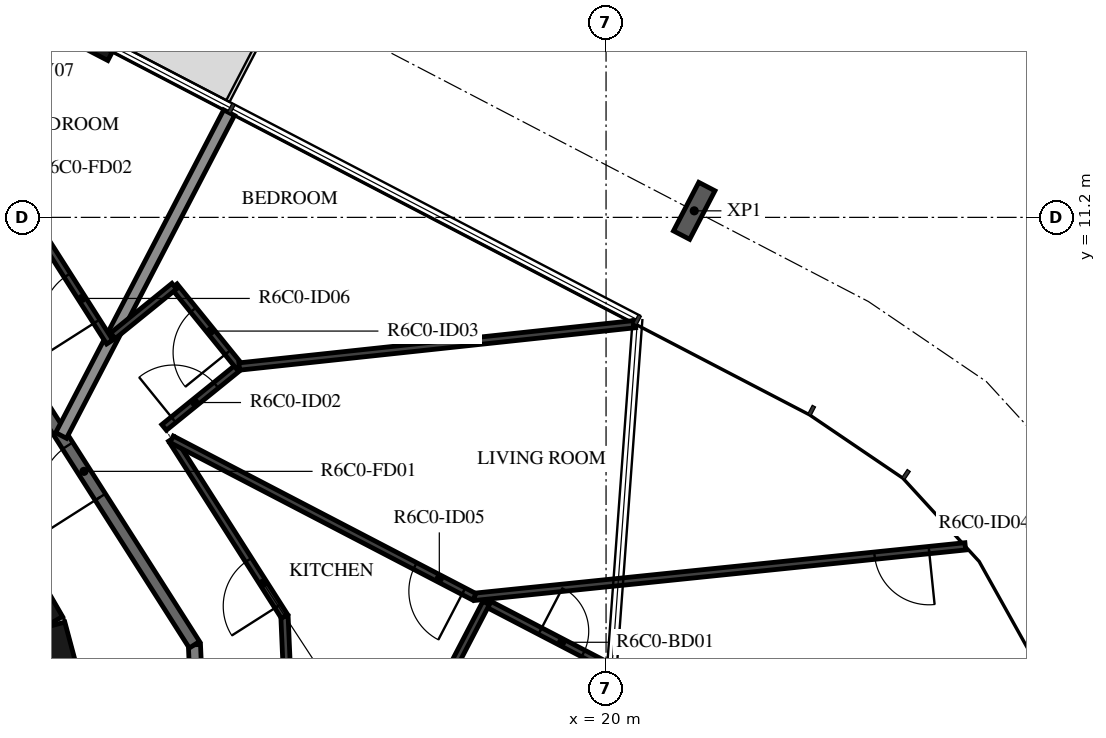
"""IFC4 building model, lengths in metres.
Left out: names, types, materials, properties, quantities, classifications, styles, units other than length and angle.
Written with IfcOpenShell. Run it as: python <this file> out.ifc"""

import sys

from ifc_helpers import new_model, si_unit, direction, frame, frame_2d, origin, origin_2d, place, context, subcontext, project, spatial, rectangle, i_section, extrude, element, fill, save


model = new_model("IFC4")
c1 = context("Model", 3, precision=1e-05, world=origin(), true_north=direction((0.0, 1.0)))
c2 = subcontext(c1, "Body", "Model", "MODEL_VIEW")
j1 = project(units=[si_unit("LENGTHUNIT", "METRE"), si_unit("PLANEANGLEUNIT", "RADIAN")], contexts=[c1])
p1 = place(None, origin())
s1 = spatial("IfcSite", under=j1, at=p1, CompositionType="ELEMENT")
p2 = place(p1, origin())
s2 = spatial("IfcBuilding", under=s1, at=p2, CompositionType="ELEMENT")
p3 = place(p2, frame((0.0, 0.0, 247.7)))
s3 = spatial("IfcBuildingStorey", under=s2, at=p3, CompositionType="ELEMENT", Elevation=247.7)
p4 = place(p3, frame((21.45, 11.308, -0.38), z_axis=(0.0, 0.0, 1.0), x_axis=(0.887010710334, -0.461748849216, 0.0)))
e1 = element("IfcColumn", 1, at=p4, inside=s3, PredefinedType="COLUMN", context=c2, shape_type="SweptSolid", body=[
    extrude(i_section(OverallWidth=0.3, OverallDepth=0.9, WebThickness=0.019, FlangeThickness=0.035, FilletRadius=0.03, at=origin_2d()), origin(), (0.0, 0.0, 1.0), 3.5),
])
p5 = place(p3, frame((11.844, 13.851, 0.0), z_axis=(0.0, 0.0, 1.0), x_axis=(-0.887014349583, 0.461741858221, 0.0)))
e2 = element("IfcWall", 2, at=p5, inside=s3, PredefinedType="STANDARD", context=c2, shape_type="SweptSolid", body=[
    extrude(rectangle(XDim=3.2, YDim=0.16, at=frame_2d((1.6, 0.0))), origin(), (0.0, 0.0, 1.0), 3.12),
])
p6 = place(p5, frame((0.4, 0.0, 0.0)))
e3 = element("IfcOpeningElement", 3, at=p6, cuts=e2, PredefinedType="OPENING", context=c2, shape_type="SweptSolid", body=[
    extrude(rectangle(XDim=2.4, YDim=2.4, at=frame_2d((1.2, 1.2))), frame((0.0, 0.09, 0.0), z_axis=(0.0, -1.0, 0.0), x_axis=(1.0, 0.0, 0.0)), (0.0, 0.0, 1.0), 0.18),
])
for number, where, z_axis, x_axis in (
    (4, (11.643, 1.55, 0.0), (0.0, 0.0, 1.0), (-0.259, 0.966, 0.0)),
    (5, (10.845, 4.51, 0.0), (0.0, 0.0, 1.0), (-0.5, 0.866, 0.0)),
):
    element("IfcWall", number, at=place(p3, frame(where, z_axis=z_axis, x_axis=x_axis)), inside=s3, PredefinedType="SHEAR", context=c2, shape_type="SweptSolid", body=[
        extrude(rectangle(XDim=3.033, YDim=0.5, at=frame_2d((1.516, 0.0))), origin(), (0.0, 0.0, 1.0), 3.12),
    ])
p7 = place(p3, frame((13.331, 1.874, 0.0), z_axis=(0.0, 0.0, 1.0), x_axis=(-0.043621457762, 0.999048131184, 0.0)))
e6 = element("IfcWall", 6, at=p7, inside=s3, PredefinedType="STANDARD", context=c2, shape_type="SweptSolid", body=[
    extrude(rectangle(XDim=2.3, YDim=0.2, at=frame_2d((1.15, 0.0))), origin(), (0.0, 0.0, 1.0), 3.12),
])
p8 = place(p3, frame((13.231, 4.172, 0.0), z_axis=(0.0, 0.0, 1.0), x_axis=(-0.537304397561, 0.843388394728, 0.0)))
e7 = element("IfcWall", 7, at=p8, inside=s3, PredefinedType="STANDARD", context=c2, shape_type="SweptSolid", body=[
    extrude(rectangle(XDim=7.181, YDim=0.2, at=frame_2d((3.59, 0.0))), origin(), (0.0, 0.0, 1.0), 3.12),
])
p9 = place(p8, frame((2.881, 0.0, 0.0)))
e8 = element("IfcOpeningElement", 8, at=p9, cuts=e7, PredefinedType="OPENING", context=c2, shape_type="SweptSolid", body=[
    extrude(rectangle(XDim=1.0, YDim=2.1, at=frame_2d((0.5, 1.05))), frame((0.0, 0.11, 0.0), z_axis=(0.0, -1.0, 0.0), x_axis=(1.0, 0.0, 0.0)), (0.0, 0.0, 1.0), 0.22),
])
p10 = place(p8, frame((5.681, 0.0, 0.0)))
e9 = element("IfcOpeningElement", 9, at=p10, cuts=e7, PredefinedType="OPENING", context=c2, shape_type="SweptSolid", body=[
    extrude(rectangle(XDim=1.0, YDim=2.1, at=frame_2d((0.5, 1.05))), frame((0.0, 0.11, 0.0), z_axis=(0.0, -1.0, 0.0), x_axis=(1.0, 0.0, 0.0)), (0.0, 0.0, 1.0), 0.22),
])
p11 = place(p3, frame((13.801, 12.922, 0.0), z_axis=(0.0, 0.0, 1.0), x_axis=(-0.461726485624, -0.887022351733, 0.0)))
e10 = element("IfcWall", 10, at=p11, inside=s3, PredefinedType="STANDARD", context=c2, shape_type="SweptSolid", body=[
    extrude(rectangle(XDim=5.984, YDim=0.2, at=frame_2d((2.992, 0.0))), origin(), (0.0, 0.0, 1.0), 2.73),
])
p12 = place(p3, frame((14.761, 3.5, 0.0), z_axis=(0.0, 0.0, 1.0), x_axis=(-0.04369750018, 0.999044808043, 0.0)))
e11 = element("IfcWall", 11, at=p12, inside=s3, PredefinedType="PARTITIONING", context=c2, shape_type="SweptSolid", body=[
    extrude(rectangle(XDim=1.14, YDim=0.12, at=frame_2d((0.57, 0.0))), origin(), (0.0, 0.0, 1.0), 3.12),
])
p13 = place(p3, frame((14.712, 4.639, 0.0), z_axis=(0.0, 0.0, 1.0), x_axis=(-0.537287126609, 0.843399397427, 0.0)))
e12 = element("IfcWall", 12, at=p13, inside=s3, PredefinedType="PARTITIONING", context=c2, shape_type="SweptSolid", body=[
    extrude(rectangle(XDim=3.453, YDim=0.12, at=frame_2d((1.727, 0.0))), origin(), (0.0, 0.0, 1.0), 3.12),
])
p14 = place(p13, frame((0.2, 0.0, 0.0)))
e13 = element("IfcOpeningElement", 13, at=p14, cuts=e12, PredefinedType="OPENING", context=c2, shape_type="SweptSolid", body=[
    extrude(rectangle(XDim=0.9, YDim=2.1, at=frame_2d((0.45, 1.05))), frame((0.0, 0.07, 0.0), z_axis=(0.0, -1.0, 0.0), x_axis=(1.0, 0.0, 0.0)), (0.0, 0.0, 1.0), 0.14),
])
p15 = place(p3, frame((12.732, 7.746, 0.0), z_axis=(0.0, 0.0, 1.0), x_axis=(0.777187694298, 0.62926885179, 0.0)))
e14 = element("IfcWall", 14, at=p15, inside=s3, PredefinedType="PARTITIONING", context=c2, shape_type="SweptSolid", body=[
    extrude(rectangle(XDim=1.591, YDim=0.12, at=frame_2d((0.795, 0.0))), origin(), (0.0, 0.0, 1.0), 3.12),
])
p16 = place(p15, frame((0.2, 0.0, 0.0)))
e15 = element("IfcOpeningElement", 15, at=p16, cuts=e14, PredefinedType="OPENING", context=c2, shape_type="SweptSolid", body=[
    extrude(rectangle(XDim=0.9, YDim=2.1, at=frame_2d((0.45, 1.05))), frame((0.0, 0.07, 0.0), z_axis=(0.0, -1.0, 0.0), x_axis=(1.0, 0.0, 0.0)), (0.0, 0.0, 1.0), 0.14),
])
p17 = place(p3, frame((13.969, 8.747, 0.0), z_axis=(0.0, 0.0, 1.0), x_axis=(-0.629359312443, 0.777114441921, 0.0)))
e16 = element("IfcWall", 16, at=p17, inside=s3, PredefinedType="PARTITIONING", context=c2, shape_type="SweptSolid", body=[
    extrude(rectangle(XDim=1.7, YDim=0.12, at=frame_2d((0.85, 0.0))), origin(), (0.0, 0.0, 1.0), 3.12),
])
p18 = place(p17, frame((0.3, 0.0, 0.0)))
e17 = element("IfcOpeningElement", 17, at=p18, cuts=e16, PredefinedType="OPENING", context=c2, shape_type="SweptSolid", body=[
    extrude(rectangle(XDim=0.9, YDim=2.1, at=frame_2d((0.45, 1.05))), frame((0.0, 0.07, 0.0), z_axis=(0.0, -1.0, 0.0), x_axis=(1.0, 0.0, 0.0)), (0.0, 0.0, 1.0), 0.14),
])
p19 = place(p3, frame((12.898, 10.069, 0.0), z_axis=(0.0, 0.0, 1.0), x_axis=(-0.777069405334, -0.629414918232, 0.0)))
e18 = element("IfcWall", 18, at=p19, inside=s3, PredefinedType="PARTITIONING", context=c2, shape_type="SweptSolid", body=[
    extrude(rectangle(XDim=1.296, YDim=0.12, at=frame_2d((0.648, 0.0))), origin(), (0.0, 0.0, 1.0), 3.12),
])
p20 = place(p3, frame((18.028, 4.859, 0.0), z_axis=(0.0, 0.0, 1.0), x_axis=(0.88702512027, -0.46172116695, 0.0)))
e19 = element("IfcWall", 19, at=p20, inside=s3, PredefinedType="PARTITIONING", context=c2, shape_type="SweptSolid", body=[
    extrude(rectangle(XDim=2.983, YDim=0.12, at=frame_2d((1.492, 0.0))), origin(), (0.0, 0.0, 1.0), 3.12),
])
p21 = place(p20, frame((1.0, 0.0, 0.0)))
e20 = element("IfcOpeningElement", 20, at=p21, cuts=e19, PredefinedType="OPENING", context=c2, shape_type="SweptSolid", body=[
    extrude(rectangle(XDim=0.8, YDim=2.1, at=frame_2d((0.4, 1.05))), frame((0.0, 0.07, 0.0), z_axis=(0.0, -1.0, 0.0), x_axis=(1.0, 0.0, 0.0)), (0.0, 0.0, 1.0), 0.14),
])
p22 = place(p3, frame((25.908, 5.79, 0.0), z_axis=(0.0, 0.0, 1.0), x_axis=(-0.994752982456, -0.102305932847, 0.0)))
e21 = element("IfcWall", 21, at=p22, inside=s3, PredefinedType="PARTITIONING", context=c2, shape_type="SweptSolid", body=[
    extrude(rectangle(XDim=8.116, YDim=0.12, at=frame_2d((4.058, 0.0))), origin(), (0.0, 0.0, 1.0), 3.12),
])
p23 = place(p22, frame((0.6, 0.0, 0.0)))
e22 = element("IfcOpeningElement", 22, at=p23, cuts=e21, PredefinedType="OPENING", context=c2, shape_type="SweptSolid", body=[
    extrude(rectangle(XDim=0.9, YDim=2.1, at=frame_2d((0.45, 1.05))), frame((0.0, 0.07, 0.0), z_axis=(0.0, -1.0, 0.0), x_axis=(1.0, 0.0, 0.0)), (0.0, 0.0, 1.0), 0.14),
])
p24 = place(p3, frame((18.028, 4.859, 0.0), z_axis=(0.0, 0.0, 1.0), x_axis=(-0.461688901614, -0.887041914526, 0.0)))
e23 = element("IfcWall", 23, at=p24, inside=s3, PredefinedType="PARTITIONING", context=c2, shape_type="SweptSolid", body=[
    extrude(rectangle(XDim=1.532, YDim=0.12, at=frame_2d((0.766, 0.0))), origin(), (0.0, 0.0, 1.0), 3.12),
])
p25 = place(p3, frame((17.834, 4.96, 0.0), z_axis=(0.0, 0.0, 1.0), x_axis=(-0.887008743782, 0.461752626906, 0.0)))
e24 = element("IfcWall", 24, at=p25, inside=s3, PredefinedType="PARTITIONING", context=c2, shape_type="SweptSolid", body=[
    extrude(rectangle(XDim=5.612, YDim=0.12, at=frame_2d((2.806, 0.0))), origin(), (0.0, 0.0, 1.0), 3.12),
])
p26 = place(p25, frame((0.2, 0.0, 0.0)))
e25 = element("IfcOpeningElement", 25, at=p26, cuts=e24, PredefinedType="OPENING", context=c2, shape_type="SweptSolid", body=[
    extrude(rectangle(XDim=0.9, YDim=2.1, at=frame_2d((0.45, 1.05))), frame((0.0, 0.07, 0.0), z_axis=(0.0, -1.0, 0.0), x_axis=(1.0, 0.0, 0.0)), (0.0, 0.0, 1.0), 0.14),
])
p27 = place(p3, frame((20.48, 9.445, 0.0), z_axis=(0.0, 0.0, 1.0), x_axis=(-0.994311974195, -0.106506797776, 0.0)))
e26 = element("IfcWall", 26, at=p27, inside=s3, PredefinedType="PARTITIONING", context=c2, shape_type="SweptSolid", body=[
    extrude(rectangle(XDim=6.549, YDim=0.12, at=frame_2d((3.274, 0.0))), origin(), (0.0, 0.0, 1.0), 3.12),
])
p28 = place(p3, frame((11.838, 9.15, 0.0), z_axis=(0.0, 0.0, 1.0), x_axis=(-0.537288949014, 0.843398236462, 0.0)))
e27 = element("IfcWall", 27, at=p28, inside=s3, PredefinedType="PARTITIONING", context=c2, shape_type="SweptSolid", body=[
    extrude(rectangle(XDim=2.636, YDim=0.12, at=frame_2d((1.318, 0.0))), origin(), (0.0, 0.0, 1.0), 3.12),
])
p29 = place(p28, frame((0.4, 0.0, 0.0)))
e28 = element("IfcOpeningElement", 28, at=p29, cuts=e27, PredefinedType="OPENING", context=c2, shape_type="SweptSolid", body=[
    extrude(rectangle(XDim=0.9, YDim=2.1, at=frame_2d((0.45, 1.05))), frame((0.0, 0.07, 0.0), z_axis=(0.0, -1.0, 0.0), x_axis=(1.0, 0.0, 0.0)), (0.0, 0.0, 1.0), 0.14),
])
p30 = place(p9, origin())
e29 = element("IfcDoor", 29, at=p30, inside=s3, OperationType="SINGLE_SWING_LEFT", PredefinedType="DOOR", context=c2, shape_type="SweptSolid", body=[
    extrude(rectangle(XDim=1.0, YDim=2.1, at=frame_2d((0.5, 1.05))), frame((0.0, 0.025, 0.0), z_axis=(0.0, -1.0, 0.0), x_axis=(1.0, 0.0, 0.0)), (0.0, 0.0, 1.0), 0.05),
])
fill(e8, e29)
p31 = place(p14, origin())
e30 = element("IfcDoor", 30, at=p31, inside=s3, OperationType="SINGLE_SWING_LEFT", PredefinedType="DOOR", context=c2, shape_type="SweptSolid", body=[
    extrude(rectangle(XDim=0.9, YDim=2.1, at=frame_2d((0.45, 1.05))), frame((0.0, 0.025, 0.0), z_axis=(0.0, -1.0, 0.0), x_axis=(1.0, 0.0, 0.0)), (0.0, 0.0, 1.0), 0.05),
])
fill(e13, e30)
p32 = place(p16, origin())
e31 = element("IfcDoor", 31, at=p32, inside=s3, OperationType="SINGLE_SWING_RIGHT", PredefinedType="DOOR", context=c2, shape_type="SweptSolid", body=[
    extrude(rectangle(XDim=0.9, YDim=2.1, at=frame_2d((0.45, 1.05))), frame((0.0, 0.025, 0.0), z_axis=(0.0, -1.0, 0.0), x_axis=(1.0, 0.0, 0.0)), (0.0, 0.0, 1.0), 0.05),
])
fill(e15, e31)
p33 = place(p18, origin())
e32 = element("IfcDoor", 32, at=p33, inside=s3, OperationType="SINGLE_SWING_LEFT", PredefinedType="DOOR", context=c2, shape_type="SweptSolid", body=[
    extrude(rectangle(XDim=0.9, YDim=2.1, at=frame_2d((0.45, 1.05))), frame((0.0, 0.025, 0.0), z_axis=(0.0, -1.0, 0.0), x_axis=(1.0, 0.0, 0.0)), (0.0, 0.0, 1.0), 0.05),
])
fill(e17, e32)
p34 = place(p23, origin())
e33 = element("IfcDoor", 33, at=p34, inside=s3, OperationType="SINGLE_SWING_LEFT", PredefinedType="DOOR", context=c2, shape_type="SweptSolid", body=[
    extrude(rectangle(XDim=0.9, YDim=2.1, at=frame_2d((0.45, 1.05))), frame((0.0, 0.025, 0.0), z_axis=(0.0, -1.0, 0.0), x_axis=(1.0, 0.0, 0.0)), (0.0, 0.0, 1.0), 0.05),
])
fill(e22, e33)
p35 = place(p21, origin())
e34 = element("IfcDoor", 34, at=p35, inside=s3, OperationType="SINGLE_SWING_RIGHT", PredefinedType="DOOR", context=c2, shape_type="SweptSolid", body=[
    extrude(rectangle(XDim=0.8, YDim=2.1, at=frame_2d((0.4, 1.05))), frame((0.0, 0.025, 0.0), z_axis=(0.0, -1.0, 0.0), x_axis=(1.0, 0.0, 0.0)), (0.0, 0.0, 1.0), 0.05),
])
fill(e20, e34)
p36 = place(p26, origin())
e35 = element("IfcDoor", 35, at=p36, inside=s3, OperationType="SINGLE_SWING_RIGHT", PredefinedType="DOOR", context=c2, shape_type="SweptSolid", body=[
    extrude(rectangle(XDim=0.9, YDim=2.1, at=frame_2d((0.45, 1.05))), frame((0.0, 0.025, 0.0), z_axis=(0.0, -1.0, 0.0), x_axis=(1.0, 0.0, 0.0)), (0.0, 0.0, 1.0), 0.05),
])
fill(e25, e35)
p37 = place(p29, origin())
e36 = element("IfcDoor", 36, at=p37, inside=s3, OperationType="SINGLE_SWING_LEFT", PredefinedType="DOOR", context=c2, shape_type="SweptSolid", body=[
    extrude(rectangle(XDim=0.9, YDim=2.1, at=frame_2d((0.45, 1.05))), frame((0.0, 0.025, 0.0), z_axis=(0.0, -1.0, 0.0), x_axis=(1.0, 0.0, 0.0)), (0.0, 0.0, 1.0), 0.05),
])
fill(e28, e36)
save(model, sys.argv[1])
